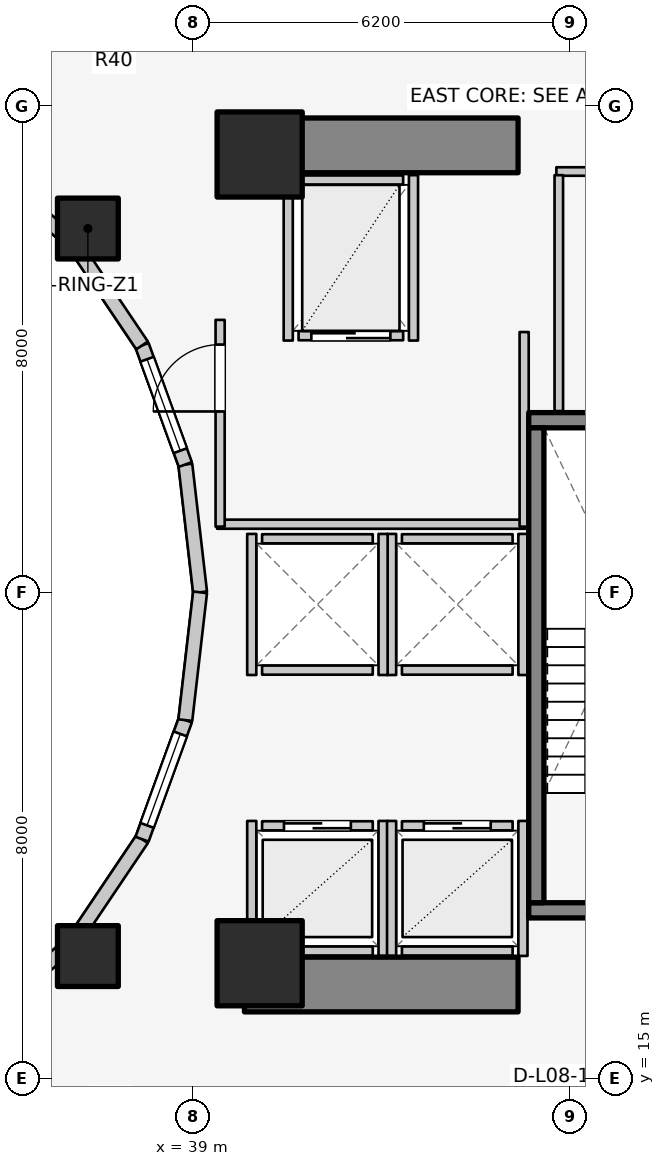
"""IFC4 building model, lengths in metres.
Left out: names, types, materials, properties, quantities, classifications, styles, units other than length and angle.
Written with IfcOpenShell. Run it as: python <this file> out.ifc"""

import sys

from ifc_helpers import new_model, si_unit, direction, frame, frame_2d, origin, origin_2d, place, context, subcontext, project, spatial, rectangle, extrude, element, fill, save


model = new_model("IFC4")
c1 = context("Model", 3, precision=1e-05, world=origin(), true_north=direction((0.0, 1.0)))
c2 = subcontext(c1, "Body", "Model", "MODEL_VIEW")
j1 = project(units=[si_unit("LENGTHUNIT", "METRE"), si_unit("PLANEANGLEUNIT", "RADIAN")], contexts=[c1])
p1 = place(None, origin())
s1 = spatial("IfcSite", under=j1, at=p1, CompositionType="ELEMENT")
p2 = place(p1, origin())
s2 = spatial("IfcBuilding", under=s1, at=p2, CompositionType="ELEMENT")
p3 = place(p2, frame((0.0, 0.0, 30.7)))
s3 = spatial("IfcBuildingStorey", under=s2, at=p3, CompositionType="ELEMENT", Elevation=30.7)
for number, where, z_axis, x_axis in (
    (1, (39.85, 16.55, 0.0), (0.0, 0.0, 1.0), (1.0, 0.0, 0.0)),
    (2, (39.85, 30.35, 0.0), (0.0, 0.0, 1.0), (1.0, 0.0, 0.0)),
):
    element("IfcWall", number, at=place(p3, frame(where, z_axis=z_axis, x_axis=x_axis)), inside=s3, PredefinedType="SHEAR", context=c2, shape_type="SweptSolid", body=[
        extrude(rectangle(XDim=4.5, YDim=0.9, at=frame_2d((2.25, 0.0))), origin(), (0.0, 0.0, 1.0), 3.1),
    ])
p4 = place(p3, frame((44.525, 17.77, 0.0), z_axis=(0.0, 0.0, 1.0), x_axis=(1.0, 0.0, 0.0)))
e3 = element("IfcWall", 3, at=p4, inside=s3, PredefinedType="SOLIDWALL", context=c2, shape_type="SweptSolid", body=[
    extrude(rectangle(XDim=3.37, YDim=0.25, at=frame_2d((1.685, 0.0))), origin(), (0.0, 0.0, 1.0), 3.1),
])
p5 = place(p4, frame((1.135, 0.0, 0.0)))
e4 = element("IfcOpeningElement", 4, at=p5, cuts=e3, PredefinedType="OPENING", context=c2, shape_type="SweptSolid", body=[
    extrude(rectangle(XDim=1.1, YDim=2.1, at=frame_2d((0.55, 1.05))), frame((0.0, 0.135, 0.0), z_axis=(0.0, -1.0, 0.0), x_axis=(1.0, 0.0, 0.0)), (0.0, 0.0, 1.0), 0.27),
])
p6 = place(p3, frame((44.525, 25.83, 0.0), z_axis=(0.0, 0.0, 1.0), x_axis=(1.0, 0.0, 0.0)))
e5 = element("IfcWall", 5, at=p6, inside=s3, PredefinedType="SOLIDWALL", context=c2, shape_type="SweptSolid", body=[
    extrude(rectangle(XDim=3.37, YDim=0.25, at=frame_2d((1.685, 0.0))), origin(), (0.0, 0.0, 1.0), 3.1),
])
p7 = place(p3, frame((44.65, 17.895, 0.0), z_axis=(0.0, 0.0, 1.0), x_axis=(0.0, 1.0, 0.0)))
e6 = element("IfcWall", 6, at=p7, inside=s3, PredefinedType="SOLIDWALL", context=c2, shape_type="SweptSolid", body=[
    extrude(rectangle(XDim=7.81, YDim=0.25, at=frame_2d((3.905, 0.0))), origin(), (0.0, 0.0, 1.0), 3.1),
])
for number, where, z_axis, x_axis in (
    (7, (40.1, 16.9, 0.0), (0.0, 0.0, 1.0), (1.0, 0.0, 0.0)),
    (8, (40.1, 30.2, 0.0), (0.0, 0.0, 1.0), (1.0, 0.0, 0.0)),
):
    element("IfcColumn", number, at=place(p3, frame(where, z_axis=z_axis, x_axis=x_axis)), inside=s3, PredefinedType="COLUMN", context=c2, shape_type="SweptSolid", body=[
        extrude(rectangle(XDim=1.4, YDim=1.4, at=origin_2d()), origin(), (0.0, 0.0, 1.0), 3.1),
    ])
for number, where, z_axis, x_axis in (
    (9, (37.275, 28.982, 0.0), (0.0, 0.0, 1.0), (1.0, 0.0, 0.0)),
    (10, (37.275, 17.018, 0.0), (0.0, 0.0, 1.0), (1.0, 0.0, 0.0)),
):
    element("IfcColumn", number, at=place(p3, frame(where, z_axis=z_axis, x_axis=x_axis)), inside=s3, PredefinedType="COLUMN", context=c2, shape_type="SweptSolid", body=[
        extrude(rectangle(XDim=1.0, YDim=1.0, at=origin_2d()), origin(), (0.0, 0.0, 1.0), 3.1),
    ])
p8 = place(p3, frame((39.12, 23.0, 0.0), z_axis=(0.0, 0.0, 1.0), x_axis=(-0.114711713601, 0.993398823617, 0.0)))
e11 = element("IfcWall", 11, at=p8, inside=s3, PredefinedType="STANDARD", context=c2, shape_type="SweptSolid", body=[
    extrude(rectangle(XDim=2.115, YDim=0.23, at=frame_2d((1.058, 0.0))), origin(), (0.0, 0.0, 1.0), 2.84),
])
p9 = place(p3, frame((38.877, 25.102, 0.0), z_axis=(0.0, 0.0, 1.0), x_axis=(-0.341423187295, 0.93990968033, 0.0)))
e12 = element("IfcWall", 12, at=p9, inside=s3, PredefinedType="STANDARD", context=c2, shape_type="SweptSolid", body=[
    extrude(rectangle(XDim=2.084, YDim=0.23, at=frame_2d((1.042, 0.0))), origin(), (0.0, 0.0, 1.0), 2.84),
])
p10 = place(p9, frame((0.242, 0.0, 0.85)))
e13 = element("IfcOpeningElement", 13, at=p10, cuts=e12, PredefinedType="OPENING", context=c2, shape_type="SweptSolid", body=[
    extrude(rectangle(XDim=1.6, YDim=1.65, at=frame_2d((0.8, 0.825))), frame((0.0, 0.125, 0.0), z_axis=(0.0, -1.0, 0.0), x_axis=(1.0, 0.0, 0.0)), (0.0, 0.0, 1.0), 0.25),
])
p11 = place(p3, frame((38.166, 27.06, 0.0), z_axis=(0.0, 0.0, 1.0), x_axis=(-0.558197800898, 0.829707909492, 0.0)))
e14 = element("IfcWall", 14, at=p11, inside=s3, PredefinedType="STANDARD", context=c2, shape_type="SweptSolid", body=[
    extrude(rectangle(XDim=2.027, YDim=0.23, at=frame_2d((1.013, 0.0))), origin(), (0.0, 0.0, 1.0), 2.16),
])
for number, where, z_axis, x_axis in (
    (15, (37.035, 28.742, 0.0), (0.0, 0.0, 1.0), (-0.753, 0.659, 0.0)),
    (16, (35.56, 15.968, 0.0), (0.0, 0.0, 1.0), (0.753, 0.659, 0.0)),
):
    element("IfcWall", number, at=place(p3, frame(where, z_axis=z_axis, x_axis=x_axis)), inside=s3, PredefinedType="STANDARD", context=c2, shape_type="SweptSolid", body=[
        extrude(rectangle(XDim=1.959, YDim=0.23, at=frame_2d((0.98, 0.0))), origin(), (0.0, 0.0, 1.0), 2.16),
    ])
p12 = place(p3, frame((37.035, 17.258, 0.0), z_axis=(0.0, 0.0, 1.0), x_axis=(0.558197800898, 0.829707909492, 0.0)))
e17 = element("IfcWall", 17, at=p12, inside=s3, PredefinedType="STANDARD", context=c2, shape_type="SweptSolid", body=[
    extrude(rectangle(XDim=2.027, YDim=0.23, at=frame_2d((1.013, 0.0))), origin(), (0.0, 0.0, 1.0), 2.16),
])
p13 = place(p3, frame((38.166, 18.94, 0.0), z_axis=(0.0, 0.0, 1.0), x_axis=(0.341423187295, 0.93990968033, 0.0)))
e18 = element("IfcWall", 18, at=p13, inside=s3, PredefinedType="STANDARD", context=c2, shape_type="SweptSolid", body=[
    extrude(rectangle(XDim=2.084, YDim=0.23, at=frame_2d((1.042, 0.0))), origin(), (0.0, 0.0, 1.0), 2.84),
])
p14 = place(p13, frame((0.242, 0.0, 0.85)))
e19 = element("IfcOpeningElement", 19, at=p14, cuts=e18, PredefinedType="OPENING", context=c2, shape_type="SweptSolid", body=[
    extrude(rectangle(XDim=1.6, YDim=1.65, at=frame_2d((0.8, 0.825))), frame((0.0, 0.125, 0.0), z_axis=(0.0, -1.0, 0.0), x_axis=(1.0, 0.0, 0.0)), (0.0, 0.0, 1.0), 0.25),
])
p15 = place(p3, frame((38.877, 20.898, 0.0), z_axis=(0.0, 0.0, 1.0), x_axis=(0.114711713601, 0.993398823617, 0.0)))
e20 = element("IfcWall", 20, at=p15, inside=s3, PredefinedType="STANDARD", context=c2, shape_type="SweptSolid", body=[
    extrude(rectangle(XDim=2.115, YDim=0.23, at=frame_2d((1.058, 0.0))), origin(), (0.0, 0.0, 1.0), 2.84),
])
p16 = place(p3, frame((40.14, 19.16, 0.0), z_axis=(0.0, 0.0, 1.0), x_axis=(1.0, 0.0, 0.0)))
e21 = element("IfcWall", 21, at=p16, inside=s3, PredefinedType="SOLIDWALL", context=c2, shape_type="SweptSolid", body=[
    extrude(rectangle(XDim=1.82, YDim=0.15, at=frame_2d((0.91, 0.0))), origin(), (0.0, 0.0, 1.0), 2.12),
])
p17 = place(p16, frame((0.36, 0.0, 0.0)))
e22 = element("IfcOpeningElement", 22, at=p17, cuts=e21, PredefinedType="OPENING", context=c2, shape_type="SweptSolid", body=[
    extrude(rectangle(XDim=1.1, YDim=2.1, at=frame_2d((0.55, 1.05))), frame((0.0, 0.085, 0.0), z_axis=(0.0, -1.0, 0.0), x_axis=(1.0, 0.0, 0.0)), (0.0, 0.0, 1.0), 0.17),
])
p18 = place(p3, frame((40.14, 17.1, 0.0), z_axis=(0.0, 0.0, 1.0), x_axis=(1.0, 0.0, 0.0)))
e23 = element("IfcWall", 23, at=p18, inside=s3, PredefinedType="SOLIDWALL", context=c2, shape_type="SweptSolid", body=[
    extrude(rectangle(XDim=1.82, YDim=0.15, at=frame_2d((0.91, 0.0))), origin(), (0.0, 0.0, 1.0), 2.12),
])
p19 = place(p3, frame((39.97, 17.02, 0.0), z_axis=(0.0, 0.0, 1.0), x_axis=(0.0, 1.0, 0.0)))
e24 = element("IfcWall", 24, at=p19, inside=s3, PredefinedType="SOLIDWALL", context=c2, shape_type="SweptSolid", body=[
    extrude(rectangle(XDim=2.22, YDim=0.15, at=frame_2d((1.11, 0.0))), origin(), (0.0, 0.0, 1.0), 2.12),
])
p20 = place(p3, frame((42.13, 17.02, 0.0), z_axis=(0.0, 0.0, 1.0), x_axis=(0.0, 1.0, 0.0)))
e25 = element("IfcWall", 25, at=p20, inside=s3, PredefinedType="SOLIDWALL", context=c2, shape_type="SweptSolid", body=[
    extrude(rectangle(XDim=2.22, YDim=0.15, at=frame_2d((1.11, 0.0))), origin(), (0.0, 0.0, 1.0), 2.855),
])
p21 = place(p3, frame((42.44, 19.16, 0.0), z_axis=(0.0, 0.0, 1.0), x_axis=(1.0, 0.0, 0.0)))
e26 = element("IfcWall", 26, at=p21, inside=s3, PredefinedType="SOLIDWALL", context=c2, shape_type="SweptSolid", body=[
    extrude(rectangle(XDim=1.82, YDim=0.15, at=frame_2d((0.91, 0.0))), origin(), (0.0, 0.0, 1.0), 2.855),
])
p22 = place(p21, frame((0.36, 0.0, 0.0)))
e27 = element("IfcOpeningElement", 27, at=p22, cuts=e26, PredefinedType="OPENING", context=c2, shape_type="SweptSolid", body=[
    extrude(rectangle(XDim=1.1, YDim=2.1, at=frame_2d((0.55, 1.05))), frame((0.0, 0.085, 0.0), z_axis=(0.0, -1.0, 0.0), x_axis=(1.0, 0.0, 0.0)), (0.0, 0.0, 1.0), 0.17),
])
p23 = place(p3, frame((42.44, 17.1, 0.0), z_axis=(0.0, 0.0, 1.0), x_axis=(1.0, 0.0, 0.0)))
e28 = element("IfcWall", 28, at=p23, inside=s3, PredefinedType="SOLIDWALL", context=c2, shape_type="SweptSolid", body=[
    extrude(rectangle(XDim=1.82, YDim=0.15, at=frame_2d((0.91, 0.0))), origin(), (0.0, 0.0, 1.0), 2.855),
])
p24 = place(p3, frame((42.27, 17.02, 0.0), z_axis=(0.0, 0.0, 1.0), x_axis=(0.0, 1.0, 0.0)))
e29 = element("IfcWall", 29, at=p24, inside=s3, PredefinedType="SOLIDWALL", context=c2, shape_type="SweptSolid", body=[
    extrude(rectangle(XDim=2.22, YDim=0.15, at=frame_2d((1.11, 0.0))), origin(), (0.0, 0.0, 1.0), 2.855),
])
p25 = place(p3, frame((44.43, 17.02, 0.0), z_axis=(0.0, 0.0, 1.0), x_axis=(0.0, 1.0, 0.0)))
e30 = element("IfcWall", 30, at=p25, inside=s3, PredefinedType="SOLIDWALL", context=c2, shape_type="SweptSolid", body=[
    extrude(rectangle(XDim=2.22, YDim=0.15, at=frame_2d((1.11, 0.0))), origin(), (0.0, 0.0, 1.0), 2.12),
])
for number, where, z_axis, x_axis in (
    (31, (42.44, 21.72, 0.0), (0.0, 0.0, 1.0), (1.0, 0.0, 0.0)),
    (32, (42.44, 23.88, 0.0), (0.0, 0.0, 1.0), (1.0, 0.0, 0.0)),
):
    element("IfcWall", number, at=place(p3, frame(where, z_axis=z_axis, x_axis=x_axis)), inside=s3, PredefinedType="SOLIDWALL", context=c2, shape_type="SweptSolid", body=[
        extrude(rectangle(XDim=1.82, YDim=0.15, at=frame_2d((0.91, 0.0))), origin(), (0.0, 0.0, 1.0), 2.855),
    ])
for number, where, z_axis, x_axis in (
    (33, (42.27, 21.64, 0.0), (0.0, 0.0, 1.0), (0.0, 1.0, 0.0)),
    (34, (44.43, 21.64, 0.0), (0.0, 0.0, 1.0), (0.0, 1.0, 0.0)),
):
    element("IfcWall", number, at=place(p3, frame(where, z_axis=z_axis, x_axis=x_axis)), inside=s3, PredefinedType="SOLIDWALL", context=c2, shape_type="SweptSolid", body=[
        extrude(rectangle(XDim=2.32, YDim=0.15, at=frame_2d((1.16, 0.0))), origin(), (0.0, 0.0, 1.0), 2.855),
    ])
for number, where, z_axis, x_axis in (
    (35, (40.14, 21.72, 0.0), (0.0, 0.0, 1.0), (1.0, 0.0, 0.0)),
    (36, (40.14, 23.88, 0.0), (0.0, 0.0, 1.0), (1.0, 0.0, 0.0)),
):
    element("IfcWall", number, at=place(p3, frame(where, z_axis=z_axis, x_axis=x_axis)), inside=s3, PredefinedType="SOLIDWALL", context=c2, shape_type="SweptSolid", body=[
        extrude(rectangle(XDim=1.82, YDim=0.15, at=frame_2d((0.91, 0.0))), origin(), (0.0, 0.0, 1.0), 2.12),
    ])
p26 = place(p3, frame((39.97, 21.64, 0.0), z_axis=(0.0, 0.0, 1.0), x_axis=(0.0, 1.0, 0.0)))
e37 = element("IfcWall", 37, at=p26, inside=s3, PredefinedType="SOLIDWALL", context=c2, shape_type="SweptSolid", body=[
    extrude(rectangle(XDim=2.32, YDim=0.15, at=frame_2d((1.16, 0.0))), origin(), (0.0, 0.0, 1.0), 2.12),
])
p27 = place(p3, frame((42.13, 21.64, 0.0), z_axis=(0.0, 0.0, 1.0), x_axis=(0.0, 1.0, 0.0)))
e38 = element("IfcWall", 38, at=p27, inside=s3, PredefinedType="SOLIDWALL", context=c2, shape_type="SweptSolid", body=[
    extrude(rectangle(XDim=2.32, YDim=0.15, at=frame_2d((1.16, 0.0))), origin(), (0.0, 0.0, 1.0), 2.855),
])
p28 = place(p3, frame((40.74, 27.22, 0.0), z_axis=(0.0, 0.0, 1.0), x_axis=(1.0, 0.0, 0.0)))
e39 = element("IfcWall", 39, at=p28, inside=s3, PredefinedType="SOLIDWALL", context=c2, shape_type="SweptSolid", body=[
    extrude(rectangle(XDim=1.72, YDim=0.15, at=frame_2d((0.86, 0.0))), origin(), (0.0, 0.0, 1.0), 2.855),
])
p29 = place(p28, frame((0.21, 0.0, 0.0)))
e40 = element("IfcOpeningElement", 40, at=p29, cuts=e39, PredefinedType="OPENING", context=c2, shape_type="SweptSolid", body=[
    extrude(rectangle(XDim=1.3, YDim=2.1, at=frame_2d((0.65, 1.05))), frame((0.0, 0.085, 0.0), z_axis=(0.0, -1.0, 0.0), x_axis=(1.0, 0.0, 0.0)), (0.0, 0.0, 1.0), 0.17),
])
p30 = place(p3, frame((40.74, 29.78, 0.0), z_axis=(0.0, 0.0, 1.0), x_axis=(1.0, 0.0, 0.0)))
e41 = element("IfcWall", 41, at=p30, inside=s3, PredefinedType="SOLIDWALL", context=c2, shape_type="SweptSolid", body=[
    extrude(rectangle(XDim=1.72, YDim=0.15, at=frame_2d((0.86, 0.0))), origin(), (0.0, 0.0, 1.0), 2.855),
])
for number, where, z_axis, x_axis in (
    (42, (40.57, 27.14, 0.0), (0.0, 0.0, 1.0), (0.0, 1.0, 0.0)),
    (43, (42.63, 27.14, 0.0), (0.0, 0.0, 1.0), (0.0, 1.0, 0.0)),
):
    element("IfcWall", number, at=place(p3, frame(where, z_axis=z_axis, x_axis=x_axis)), inside=s3, PredefinedType="SOLIDWALL", context=c2, shape_type="SweptSolid", body=[
        extrude(rectangle(XDim=2.72, YDim=0.15, at=frame_2d((1.36, 0.0))), origin(), (0.0, 0.0, 1.0), 2.855),
    ])
p31 = place(p3, frame((39.4, 24.12, 0.0), z_axis=(0.0, 0.0, 1.0), x_axis=(1.0, 0.0, 0.0)))
e44 = element("IfcWall", 44, at=p31, inside=s3, PredefinedType="PARTITIONING", context=c2, shape_type="SweptSolid", body=[
    extrude(rectangle(XDim=5.08, YDim=0.15, at=frame_2d((2.54, 0.0))), origin(), (0.0, 0.0, 1.0), 2.12),
])
p32 = place(p3, frame((44.45, 24.08, 0.0), z_axis=(0.0, 0.0, 1.0), x_axis=(0.0, 1.0, 0.0)))
e45 = element("IfcWall", 45, at=p32, inside=s3, PredefinedType="PARTITIONING", context=c2, shape_type="SweptSolid", body=[
    extrude(rectangle(XDim=3.2, YDim=0.15, at=frame_2d((1.6, 0.0))), origin(), (0.0, 0.0, 1.0), 2.855),
])
p33 = place(p3, frame((39.45, 24.08, 0.0), z_axis=(0.0, 0.0, 1.0), x_axis=(0.0, 1.0, 0.0)))
e46 = element("IfcWall", 46, at=p33, inside=s3, PredefinedType="PARTITIONING", context=c2, shape_type="SweptSolid", body=[
    extrude(rectangle(XDim=3.4, YDim=0.15, at=frame_2d((1.7, 0.0))), origin(), (0.0, 0.0, 1.0), 2.855),
])
p34 = place(p33, frame((1.894, 0.0, 0.0)))
e47 = element("IfcOpeningElement", 47, at=p34, cuts=e46, PredefinedType="OPENING", context=c2, shape_type="SweptSolid", body=[
    extrude(rectangle(XDim=1.1, YDim=2.1, at=frame_2d((0.55, 1.05))), frame((0.0, 0.085, 0.0), z_axis=(0.0, -1.0, 0.0), x_axis=(1.0, 0.0, 0.0)), (0.0, 0.0, 1.0), 0.17),
])
p35 = place(p3, frame((44.98, 29.92, 0.0), z_axis=(0.0, 0.0, 1.0), x_axis=(1.0, 0.0, 0.0)))
e48 = element("IfcWall", 48, at=p35, inside=s3, PredefinedType="PLUMBINGWALL", context=c2, shape_type="SweptSolid", body=[
    extrude(rectangle(XDim=2.9, YDim=0.14, at=frame_2d((1.45, 0.0))), origin(), (0.0, 0.0, 1.0), 2.855),
])
p36 = place(p35, frame((0.516, 0.0, 0.0)))
e49 = element("IfcOpeningElement", 49, at=p36, cuts=e48, PredefinedType="OPENING", context=c2, shape_type="SweptSolid", body=[
    extrude(rectangle(XDim=0.85, YDim=2.05, at=frame_2d((0.425, 1.025))), frame((0.0, 0.08, 0.0), z_axis=(0.0, -1.0, 0.0), x_axis=(1.0, 0.0, 0.0)), (0.0, 0.0, 1.0), 0.16),
])
p37 = place(p3, frame((45.02, 25.98, 0.0), z_axis=(0.0, 0.0, 1.0), x_axis=(0.0, 1.0, 0.0)))
e50 = element("IfcWall", 50, at=p37, inside=s3, PredefinedType="PLUMBINGWALL", context=c2, shape_type="SweptSolid", body=[
    extrude(rectangle(XDim=3.88, YDim=0.14, at=frame_2d((1.94, 0.0))), origin(), (0.0, 0.0, 1.0), 2.855),
])
p38 = place(p10, origin())
e51 = element("IfcWindow", 51, at=p38, inside=s3, PartitioningType="SINGLE_PANEL", PredefinedType="WINDOW", context=c2, shape_type="SweptSolid", body=[
    extrude(rectangle(XDim=1.6, YDim=1.65, at=frame_2d((0.8, 0.825))), frame((0.0, 0.03, 0.0), z_axis=(0.0, -1.0, 0.0), x_axis=(1.0, 0.0, 0.0)), (0.0, 0.0, 1.0), 0.06),
])
fill(e13, e51)
p39 = place(p14, origin())
e52 = element("IfcWindow", 52, at=p39, inside=s3, PartitioningType="SINGLE_PANEL", PredefinedType="WINDOW", context=c2, shape_type="SweptSolid", body=[
    extrude(rectangle(XDim=1.6, YDim=1.65, at=frame_2d((0.8, 0.825))), frame((0.0, 0.03, 0.0), z_axis=(0.0, -1.0, 0.0), x_axis=(1.0, 0.0, 0.0)), (0.0, 0.0, 1.0), 0.06),
])
fill(e19, e52)
p40 = place(p17, origin())
e53 = element("IfcDoor", 53, at=p40, inside=s3, OperationType="DOUBLE_DOOR_SLIDING", PredefinedType="DOOR", context=c2, shape_type="SweptSolid", body=[
    extrude(rectangle(XDim=1.1, YDim=2.1, at=frame_2d((0.55, 1.05))), frame((0.0, 0.025, 0.0), z_axis=(0.0, -1.0, 0.0), x_axis=(1.0, 0.0, 0.0)), (0.0, 0.0, 1.0), 0.05),
])
fill(e22, e53)
p41 = place(p22, origin())
e54 = element("IfcDoor", 54, at=p41, inside=s3, OperationType="DOUBLE_DOOR_SLIDING", PredefinedType="DOOR", context=c2, shape_type="SweptSolid", body=[
    extrude(rectangle(XDim=1.1, YDim=2.1, at=frame_2d((0.55, 1.05))), frame((0.0, 0.025, 0.0), z_axis=(0.0, -1.0, 0.0), x_axis=(1.0, 0.0, 0.0)), (0.0, 0.0, 1.0), 0.05),
])
fill(e27, e54)
p42 = place(p29, origin())
e55 = element("IfcDoor", 55, at=p42, inside=s3, OperationType="DOUBLE_DOOR_SLIDING", PredefinedType="DOOR", context=c2, shape_type="SweptSolid", body=[
    extrude(rectangle(XDim=1.3, YDim=2.1, at=frame_2d((0.65, 1.05))), frame((0.0, 0.025, 0.0), z_axis=(0.0, -1.0, 0.0), x_axis=(1.0, 0.0, 0.0)), (0.0, 0.0, 1.0), 0.05),
])
fill(e40, e55)
p43 = place(p34, origin())
e56 = element("IfcDoor", 56, at=p43, inside=s3, OperationType="SINGLE_SWING_LEFT", PredefinedType="DOOR", context=c2, shape_type="SweptSolid", body=[
    extrude(rectangle(XDim=1.1, YDim=2.1, at=frame_2d((0.55, 1.05))), frame((0.0, 0.025, 0.0), z_axis=(0.0, -1.0, 0.0), x_axis=(1.0, 0.0, 0.0)), (0.0, 0.0, 1.0), 0.05),
])
fill(e47, e56)
save(model, sys.argv[1])
